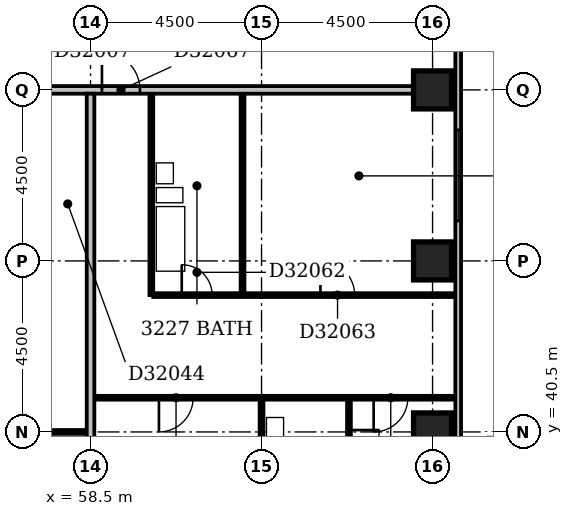
"""IFC4 building model, lengths in metres.
Left out: names, types, materials, properties, quantities, classifications, styles, units other than length and angle.
Written with IfcOpenShell. Run it as: python <this file> out.ifc"""

import sys

from ifc_helpers import new_model, si_unit, direction, frame, frame_2d, origin, origin_2d, place, context, subcontext, project, spatial, rectangle, extrude, element, fill, save


model = new_model("IFC4")
c1 = context("Model", 3, precision=1e-05, world=origin(), true_north=direction((0.0, 1.0)))
c2 = subcontext(c1, "Body", "Model", "MODEL_VIEW")
j1 = project(units=[si_unit("LENGTHUNIT", "METRE"), si_unit("PLANEANGLEUNIT", "RADIAN")], contexts=[c1])
p1 = place(None, origin())
s1 = spatial("IfcSite", under=j1, at=p1, CompositionType="ELEMENT")
p2 = place(p1, origin())
s2 = spatial("IfcBuilding", under=s1, at=p2, CompositionType="ELEMENT")
p3 = place(p2, frame((0.0, 0.0, 130.4)))
s3 = spatial("IfcBuildingStorey", under=s2, at=p3, CompositionType="ELEMENT", Elevation=130.4)
for number, where, z_axis, x_axis in (
    (1, (67.5, 40.5, -0.3), (0.0, 0.0, 1.0), (1.0, 0.0, 0.0)),
    (2, (67.5, 45.0, -0.3), (0.0, 0.0, 1.0), (1.0, 0.0, 0.0)),
    (3, (67.5, 49.5, -0.3), (0.0, 0.0, 1.0), (1.0, 0.0, 0.0)),
):
    element("IfcColumn", number, at=place(p3, frame(where, z_axis=z_axis, x_axis=x_axis)), inside=s3, PredefinedType="COLUMN", context=c2, shape_type="SweptSolid", body=[
        extrude(rectangle(XDim=1.0, YDim=1.0, at=origin_2d()), origin(), (0.0, 0.0, 1.0), 3.6),
    ])
p4 = place(p3, frame((68.175, 35.4, 0.0), z_axis=(0.0, 0.0, 1.0), x_axis=(0.0, 1.0, 0.0)))
e4 = element("IfcWall", 4, at=p4, inside=s3, PredefinedType="STANDARD", context=c2, shape_type="SweptSolid", body=[
    extrude(rectangle(XDim=23.85, YDim=0.15, at=frame_2d((11.925, 0.0))), origin(), (0.0, 0.0, 1.0), 2.7),
])
p5 = place(p4, frame((1.65, 0.0, 0.6)))
e5 = element("IfcOpeningElement", 5, at=p5, cuts=e4, PredefinedType="OPENING", context=c2, shape_type="SweptSolid", body=[
    extrude(rectangle(XDim=2.4, YDim=1.8, at=frame_2d((1.2, 0.9))), frame((0.0, 0.087, 0.0), z_axis=(0.0, -1.0, 0.0), x_axis=(1.0, 0.0, 0.0)), (0.0, 0.0, 1.0), 0.174),
])
p6 = place(p4, frame((10.65, 0.0, 0.6)))
e6 = element("IfcOpeningElement", 6, at=p6, cuts=e4, PredefinedType="OPENING", context=c2, shape_type="SweptSolid", body=[
    extrude(rectangle(XDim=2.4, YDim=1.8, at=frame_2d((1.2, 0.9))), frame((0.0, 0.087, 0.0), z_axis=(0.0, -1.0, 0.0), x_axis=(1.0, 0.0, 0.0)), (0.0, 0.0, 1.0), 0.174),
])
p7 = place(p3, frame((58.5, 36.5, 0.0), z_axis=(0.0, 0.0, 1.0), x_axis=(0.0, 1.0, 0.0)))
e7 = element("IfcWall", 7, at=p7, inside=s3, PredefinedType="PARTITIONING", context=c2, shape_type="SweptSolid", body=[
    extrude(rectangle(XDim=12.9, YDim=0.2, at=frame_2d((6.45, 0.0))), origin(), (0.0, 0.0, 1.0), 3.3),
])
p8 = place(p3, frame((63.0, 36.5, 0.0), z_axis=(0.0, 0.0, 1.0), x_axis=(0.0, 1.0, 0.0)))
e8 = element("IfcWall", 8, at=p8, inside=s3, PredefinedType="PARTITIONING", context=c2, shape_type="SweptSolid", body=[
    extrude(rectangle(XDim=4.85, YDim=0.1, at=frame_2d((2.425, 0.0))), origin(), (0.0, 0.0, 1.0), 2.4),
])
p9 = place(p3, frame((65.3, 38.7, 0.0), z_axis=(0.0, 0.0, 1.0), x_axis=(0.0, 1.0, 0.0)))
e9 = element("IfcWall", 9, at=p9, inside=s3, PredefinedType="PLUMBINGWALL", context=c2, shape_type="SweptSolid", body=[
    extrude(rectangle(XDim=2.65, YDim=0.1, at=frame_2d((1.325, 0.0))), origin(), (0.0, 0.0, 1.0), 3.3),
])
p10 = place(p9, frame((1.05, 0.0, 0.0)))
e10 = element("IfcOpeningElement", 10, at=p10, cuts=e9, PredefinedType="OPENING", context=c2, shape_type="SweptSolid", body=[
    extrude(rectangle(XDim=0.8, YDim=2.1, at=frame_2d((0.4, 1.05))), frame((0.0, 0.062, 0.0), z_axis=(0.0, -1.0, 0.0), x_axis=(1.0, 0.0, 0.0)), (0.0, 0.0, 1.0), 0.124),
])
p11 = place(p3, frame((54.1, 40.5, 0.0), z_axis=(0.0, 0.0, 1.0), x_axis=(1.0, 0.0, 0.0)))
e11 = element("IfcWall", 11, at=p11, inside=s3, PredefinedType="PARTITIONING", context=c2, shape_type="SweptSolid", body=[
    extrude(rectangle(XDim=4.3, YDim=0.1, at=frame_2d((2.15, 0.0))), origin(), (0.0, 0.0, 1.0), 3.3),
])
p12 = place(p11, frame((1.7, 0.0, 0.0)))
e12 = element("IfcOpeningElement", 12, at=p12, cuts=e11, PredefinedType="OPENING", context=c2, shape_type="SweptSolid", body=[
    extrude(rectangle(XDim=0.9, YDim=2.1, at=frame_2d((0.45, 1.05))), frame((0.0, 0.062, 0.0), z_axis=(0.0, -1.0, 0.0), x_axis=(1.0, 0.0, 0.0)), (0.0, 0.0, 1.0), 0.124),
])
p13 = place(p3, frame((58.6, 41.4, 0.0), z_axis=(0.0, 0.0, 1.0), x_axis=(1.0, 0.0, 0.0)))
e13 = element("IfcWall", 13, at=p13, inside=s3, PredefinedType="PARTITIONING", context=c2, shape_type="SweptSolid", body=[
    extrude(rectangle(XDim=9.5, YDim=0.1, at=frame_2d((4.75, 0.0))), origin(), (0.0, 0.0, 1.0), 3.3),
])
p14 = place(p13, frame((1.7, 0.0, 0.0)))
e14 = element("IfcOpeningElement", 14, at=p14, cuts=e13, PredefinedType="OPENING", context=c2, shape_type="SweptSolid", body=[
    extrude(rectangle(XDim=0.9, YDim=2.1, at=frame_2d((0.45, 1.05))), frame((0.0, 0.062, 0.0), z_axis=(0.0, -1.0, 0.0), x_axis=(1.0, 0.0, 0.0)), (0.0, 0.0, 1.0), 0.124),
])
p15 = place(p13, frame((7.35, 0.0, 0.0)))
e15 = element("IfcOpeningElement", 15, at=p15, cuts=e13, PredefinedType="OPENING", context=c2, shape_type="SweptSolid", body=[
    extrude(rectangle(XDim=0.9, YDim=2.1, at=frame_2d((0.45, 1.05))), frame((0.0, 0.062, 0.0), z_axis=(0.0, -1.0, 0.0), x_axis=(1.0, 0.0, 0.0)), (0.0, 0.0, 1.0), 0.124),
])
p16 = place(p3, frame((60.1, 44.1, 0.0), z_axis=(0.0, 0.0, 1.0), x_axis=(0.0, 1.0, 0.0)))
e16 = element("IfcWall", 16, at=p16, inside=s3, PredefinedType="PLUMBINGWALL", context=c2, shape_type="SweptSolid", body=[
    extrude(rectangle(XDim=5.3, YDim=0.1, at=frame_2d((2.65, 0.0))), origin(), (0.0, 0.0, 1.0), 3.3),
])
p17 = place(p3, frame((60.15, 44.1, 0.0), z_axis=(0.0, 0.0, 1.0), x_axis=(1.0, 0.0, 0.0)))
e17 = element("IfcWall", 17, at=p17, inside=s3, PredefinedType="PARTITIONING", context=c2, shape_type="SweptSolid", body=[
    extrude(rectangle(XDim=7.95, YDim=0.1, at=frame_2d((3.975, 0.0))), origin(), (0.0, 0.0, 1.0), 3.3),
])
p18 = place(p17, frame((0.75, 0.0, 0.0)))
e18 = element("IfcOpeningElement", 18, at=p18, cuts=e17, PredefinedType="OPENING", context=c2, shape_type="SweptSolid", body=[
    extrude(rectangle(XDim=0.8, YDim=2.1, at=frame_2d((0.4, 1.05))), frame((0.0, 0.062, 0.0), z_axis=(0.0, -1.0, 0.0), x_axis=(1.0, 0.0, 0.0)), (0.0, 0.0, 1.0), 0.124),
])
p19 = place(p17, frame((4.4, 0.0, 0.0)))
e19 = element("IfcOpeningElement", 19, at=p19, cuts=e17, PredefinedType="OPENING", context=c2, shape_type="SweptSolid", body=[
    extrude(rectangle(XDim=0.9, YDim=2.1, at=frame_2d((0.45, 1.05))), frame((0.0, 0.062, 0.0), z_axis=(0.0, -1.0, 0.0), x_axis=(1.0, 0.0, 0.0)), (0.0, 0.0, 1.0), 0.124),
])
p20 = place(p3, frame((62.5, 44.15, 0.0), z_axis=(0.0, 0.0, 1.0), x_axis=(0.0, 1.0, 0.0)))
e20 = element("IfcWall", 20, at=p20, inside=s3, PredefinedType="PLUMBINGWALL", context=c2, shape_type="SweptSolid", body=[
    extrude(rectangle(XDim=5.25, YDim=0.1, at=frame_2d((2.625, 0.0))), origin(), (0.0, 0.0, 1.0), 2.4),
])
p21 = place(p3, frame((57.35, 49.5, 0.0), z_axis=(0.0, 0.0, 1.0), x_axis=(1.0, 0.0, 0.0)))
e21 = element("IfcWall", 21, at=p21, inside=s3, PredefinedType="PARTITIONING", context=c2, shape_type="SweptSolid", body=[
    extrude(rectangle(XDim=9.65, YDim=0.2, at=frame_2d((4.825, 0.0))), origin(), (0.0, 0.0, 1.0), 3.3),
])
p22 = place(p21, frame((1.45, 0.0, 0.0)))
e22 = element("IfcOpeningElement", 22, at=p22, cuts=e21, PredefinedType="OPENING", context=c2, shape_type="SweptSolid", body=[
    extrude(rectangle(XDim=1.0, YDim=2.1, at=frame_2d((0.5, 1.05))), frame((0.0, 0.112, 0.0), z_axis=(0.0, -1.0, 0.0), x_axis=(1.0, 0.0, 0.0)), (0.0, 0.0, 1.0), 0.224),
])
p23 = place(p6, origin())
e23 = element("IfcWindow", 23, at=p23, inside=s3, PartitioningType="SINGLE_PANEL", PredefinedType="WINDOW", context=c2, shape_type="SweptSolid", body=[
    extrude(rectangle(XDim=2.4, YDim=1.8, at=frame_2d((1.2, 0.9))), frame((0.0, 0.03, 0.0), z_axis=(0.0, -1.0, 0.0), x_axis=(1.0, 0.0, 0.0)), (0.0, 0.0, 1.0), 0.06),
])
fill(e6, e23)
p24 = place(p10, origin())
e24 = element("IfcDoor", 24, at=p24, inside=s3, OperationType="SINGLE_SWING_RIGHT", PredefinedType="DOOR", context=c2, shape_type="SweptSolid", body=[
    extrude(rectangle(XDim=0.8, YDim=2.1, at=frame_2d((0.4, 1.05))), frame((0.0, 0.025, 0.0), z_axis=(0.0, -1.0, 0.0), x_axis=(1.0, 0.0, 0.0)), (0.0, 0.0, 1.0), 0.05),
])
fill(e10, e24)
p25 = place(p14, frame((0.9, 0.0, 0.0), z_axis=(0.0, 0.0, 1.0), x_axis=(-1.0, 0.0, 0.0)))
e25 = element("IfcDoor", 25, at=p25, inside=s3, OperationType="SINGLE_SWING_RIGHT", PredefinedType="DOOR", context=c2, shape_type="SweptSolid", body=[
    extrude(rectangle(XDim=0.9, YDim=2.1, at=frame_2d((0.45, 1.05))), frame((0.0, 0.025, 0.0), z_axis=(0.0, -1.0, 0.0), x_axis=(1.0, 0.0, 0.0)), (0.0, 0.0, 1.0), 0.05),
])
fill(e14, e25)
p26 = place(p15, frame((0.9, 0.0, 0.0), z_axis=(0.0, 0.0, 1.0), x_axis=(-1.0, 0.0, 0.0)))
e26 = element("IfcDoor", 26, at=p26, inside=s3, OperationType="SINGLE_SWING_RIGHT", PredefinedType="DOOR", context=c2, shape_type="SweptSolid", body=[
    extrude(rectangle(XDim=0.9, YDim=2.1, at=frame_2d((0.45, 1.05))), frame((0.0, 0.025, 0.0), z_axis=(0.0, -1.0, 0.0), x_axis=(1.0, 0.0, 0.0)), (0.0, 0.0, 1.0), 0.05),
])
fill(e15, e26)
p27 = place(p18, origin())
e27 = element("IfcDoor", 27, at=p27, inside=s3, OperationType="SINGLE_SWING_LEFT", PredefinedType="DOOR", context=c2, shape_type="SweptSolid", body=[
    extrude(rectangle(XDim=0.8, YDim=2.1, at=frame_2d((0.4, 1.05))), frame((0.0, 0.025, 0.0), z_axis=(0.0, -1.0, 0.0), x_axis=(1.0, 0.0, 0.0)), (0.0, 0.0, 1.0), 0.05),
])
fill(e18, e27)
p28 = place(p19, origin())
e28 = element("IfcDoor", 28, at=p28, inside=s3, OperationType="SINGLE_SWING_LEFT", PredefinedType="DOOR", context=c2, shape_type="SweptSolid", body=[
    extrude(rectangle(XDim=0.9, YDim=2.1, at=frame_2d((0.45, 1.05))), frame((0.0, 0.025, 0.0), z_axis=(0.0, -1.0, 0.0), x_axis=(1.0, 0.0, 0.0)), (0.0, 0.0, 1.0), 0.05),
])
fill(e19, e28)
p29 = place(p22, origin())
e29 = element("IfcDoor", 29, at=p29, inside=s3, OperationType="SINGLE_SWING_LEFT", PredefinedType="DOOR", context=c2, shape_type="SweptSolid", body=[
    extrude(rectangle(XDim=1.0, YDim=2.1, at=frame_2d((0.5, 1.05))), frame((0.0, 0.025, 0.0), z_axis=(0.0, -1.0, 0.0), x_axis=(1.0, 0.0, 0.0)), (0.0, 0.0, 1.0), 0.05),
])
fill(e22, e29)
save(model, sys.argv[1])
